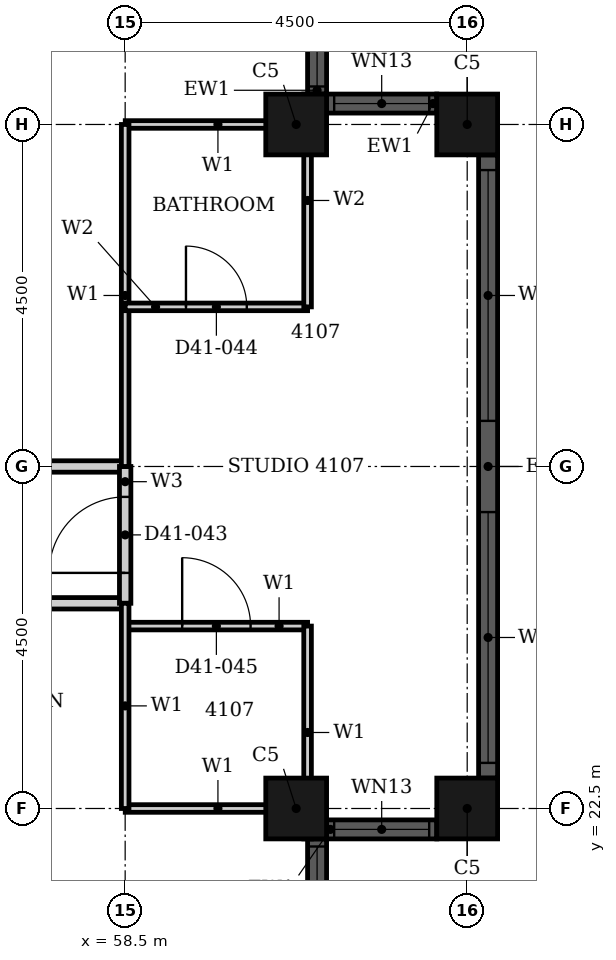
"""IFC4 building model, lengths in metres.
Left out: names, types, materials, properties, quantities, classifications, styles, units other than length and angle.
Written with IfcOpenShell. Run it as: python <this file> out.ifc"""

import sys

from ifc_helpers import new_model, si_unit, direction, frame, frame_2d, origin, origin_2d, place, context, subcontext, project, spatial, rectangle, hollow_rectangle, extrude, element, fill, save


model = new_model("IFC4")
c1 = context("Model", 3, precision=1e-05, world=origin(), true_north=direction((0.0, 1.0)))
c2 = subcontext(c1, "Body", "Model", "MODEL_VIEW")
j1 = project(units=[si_unit("LENGTHUNIT", "METRE"), si_unit("PLANEANGLEUNIT", "RADIAN")], contexts=[c1])
p1 = place(None, origin())
s1 = spatial("IfcSite", under=j1, at=p1, CompositionType="ELEMENT")
p2 = place(p1, origin())
s2 = spatial("IfcBuilding", under=s1, at=p2, CompositionType="ELEMENT")
p3 = place(p2, frame((0.0, 0.0, 165.4)))
s3 = spatial("IfcBuildingStorey", under=s2, at=p3, CompositionType="ELEMENT", Elevation=165.4)
for number, where, z_axis, x_axis in (
    (1, (60.75, 22.5, 0.0), (0.0, 0.0, 1.0), (1.0, 0.0, 0.0)),
    (2, (63.0, 22.5, 0.0), (0.0, 0.0, 1.0), (1.0, 0.0, 0.0)),
    (3, (63.0, 31.5, 0.0), (0.0, 0.0, 1.0), (1.0, 0.0, 0.0)),
    (4, (60.75, 31.5, 0.0), (0.0, 0.0, 1.0), (1.0, 0.0, 0.0)),
):
    element("IfcColumn", number, at=place(p3, frame(where, z_axis=z_axis, x_axis=x_axis)), inside=s3, PredefinedType="COLUMN", context=c2, shape_type="SweptSolid", body=[
        extrude(hollow_rectangle(XDim=0.8, YDim=0.8, WallThickness=0.025, at=origin_2d()), origin(), (0.0, 0.0, 1.0), 3.7),
    ])
p4 = place(p3, frame((61.025, 20.65, 0.0), z_axis=(0.0, 0.0, 1.0), x_axis=(0.0, 1.0, 0.0)))
e5 = element("IfcWall", 5, at=p4, inside=s3, PredefinedType="SOLIDWALL", context=c2, shape_type="SweptSolid", body=[
    extrude(rectangle(XDim=1.45, YDim=0.25, at=frame_2d((0.725, 0.0))), origin(), (0.0, 0.0, 1.0), 3.7),
])
p5 = place(p4, frame((0.1, 0.0, 0.9)))
e6 = element("IfcOpeningElement", 6, at=p5, cuts=e5, PredefinedType="OPENING", context=c2, shape_type="SweptSolid", body=[
    extrude(rectangle(XDim=1.25, YDim=1.85, at=frame_2d((0.625, 0.925))), frame((0.0, 0.135, 0.0), z_axis=(0.0, -1.0, 0.0), x_axis=(1.0, 0.0, 0.0)), (0.0, 0.0, 1.0), 0.27),
])
p6 = place(p3, frame((61.15, 22.225, 0.0), z_axis=(0.0, 0.0, 1.0), x_axis=(1.0, 0.0, 0.0)))
e7 = element("IfcWall", 7, at=p6, inside=s3, PredefinedType="SOLIDWALL", context=c2, shape_type="SweptSolid", body=[
    extrude(rectangle(XDim=1.45, YDim=0.25, at=frame_2d((0.725, 0.0))), origin(), (0.0, 0.0, 1.0), 3.7),
])
p7 = place(p6, frame((0.1, 0.0, 0.9)))
e8 = element("IfcOpeningElement", 8, at=p7, cuts=e7, PredefinedType="OPENING", context=c2, shape_type="SweptSolid", body=[
    extrude(rectangle(XDim=1.25, YDim=1.85, at=frame_2d((0.625, 0.925))), frame((0.0, 0.135, 0.0), z_axis=(0.0, -1.0, 0.0), x_axis=(1.0, 0.0, 0.0)), (0.0, 0.0, 1.0), 0.27),
])
p8 = place(p3, frame((63.275, 22.9, 0.0), z_axis=(0.0, 0.0, 1.0), x_axis=(0.0, 1.0, 0.0)))
e9 = element("IfcWall", 9, at=p8, inside=s3, PredefinedType="SOLIDWALL", context=c2, shape_type="SweptSolid", body=[
    extrude(rectangle(XDim=8.2, YDim=0.25, at=frame_2d((4.1, 0.0))), origin(), (0.0, 0.0, 1.0), 3.7),
])
p9 = place(p8, frame((0.2, 0.0, 0.45)))
e10 = element("IfcOpeningElement", 10, at=p9, cuts=e9, PredefinedType="OPENING", context=c2, shape_type="SweptSolid", body=[
    extrude(rectangle(XDim=3.3, YDim=2.3, at=frame_2d((1.65, 1.15))), frame((0.0, 0.135, 0.0), z_axis=(0.0, -1.0, 0.0), x_axis=(1.0, 0.0, 0.0)), (0.0, 0.0, 1.0), 0.27),
])
p10 = place(p8, frame((4.7, 0.0, 0.45)))
e11 = element("IfcOpeningElement", 11, at=p10, cuts=e9, PredefinedType="OPENING", context=c2, shape_type="SweptSolid", body=[
    extrude(rectangle(XDim=3.3, YDim=2.3, at=frame_2d((1.65, 1.15))), frame((0.0, 0.135, 0.0), z_axis=(0.0, -1.0, 0.0), x_axis=(1.0, 0.0, 0.0)), (0.0, 0.0, 1.0), 0.27),
])
p11 = place(p3, frame((62.6, 31.775, 0.0), z_axis=(0.0, 0.0, 1.0), x_axis=(-1.0, 0.0, 0.0)))
e12 = element("IfcWall", 12, at=p11, inside=s3, PredefinedType="SOLIDWALL", context=c2, shape_type="SweptSolid", body=[
    extrude(rectangle(XDim=1.45, YDim=0.25, at=frame_2d((0.725, 0.0))), origin(), (0.0, 0.0, 1.0), 3.7),
])
p12 = place(p11, frame((0.1, 0.0, 0.9)))
e13 = element("IfcOpeningElement", 13, at=p12, cuts=e12, PredefinedType="OPENING", context=c2, shape_type="SweptSolid", body=[
    extrude(rectangle(XDim=1.25, YDim=1.85, at=frame_2d((0.625, 0.925))), frame((0.0, 0.135, 0.0), z_axis=(0.0, -1.0, 0.0), x_axis=(1.0, 0.0, 0.0)), (0.0, 0.0, 1.0), 0.27),
])
p13 = place(p3, frame((61.025, 31.9, 0.0), z_axis=(0.0, 0.0, 1.0), x_axis=(0.0, 1.0, 0.0)))
e14 = element("IfcWall", 14, at=p13, inside=s3, PredefinedType="SOLIDWALL", context=c2, shape_type="SweptSolid", body=[
    extrude(rectangle(XDim=1.45, YDim=0.25, at=frame_2d((0.725, 0.0))), origin(), (0.0, 0.0, 1.0), 3.7),
])
p14 = place(p13, frame((0.1, 0.0, 0.9)))
e15 = element("IfcOpeningElement", 15, at=p14, cuts=e14, PredefinedType="OPENING", context=c2, shape_type="SweptSolid", body=[
    extrude(rectangle(XDim=1.25, YDim=1.85, at=frame_2d((0.625, 0.925))), frame((0.0, 0.135, 0.0), z_axis=(0.0, -1.0, 0.0), x_axis=(1.0, 0.0, 0.0)), (0.0, 0.0, 1.0), 0.27),
])
p15 = place(p3, frame((46.801, 25.2, 0.0), z_axis=(0.0, 0.0, 1.0), x_axis=(1.0, 0.0, 0.0)))
e16 = element("IfcWall", 16, at=p15, inside=s3, PredefinedType="PARTITIONING", context=c2, shape_type="SweptSolid", body=[
    extrude(rectangle(XDim=11.699, YDim=0.15, at=frame_2d((5.85, 0.0))), origin(), (0.0, 0.0, 1.0), 3.4),
])
p16 = place(p15, frame((6.698, 0.0, 0.0)))
e17 = element("IfcOpeningElement", 17, at=p16, cuts=e16, PredefinedType="OPENING", context=c2, shape_type="SweptSolid", body=[
    extrude(rectangle(XDim=1.0, YDim=2.1, at=frame_2d((0.5, 1.05))), frame((0.0, 0.085, 0.0), z_axis=(0.0, -1.0, 0.0), x_axis=(1.0, 0.0, 0.0)), (0.0, 0.0, 1.0), 0.17),
])
p17 = place(p3, frame((45.0, 27.0, 0.0), z_axis=(0.0, 0.0, 1.0), x_axis=(1.0, 0.0, 0.0)))
e18 = element("IfcWall", 18, at=p17, inside=s3, PredefinedType="PARTITIONING", context=c2, shape_type="SweptSolid", body=[
    extrude(rectangle(XDim=13.5, YDim=0.15, at=frame_2d((6.75, 0.0))), origin(), (0.0, 0.0, 1.0), 2.68),
])
p18 = place(p17, frame((7.15, 0.0, 0.0)))
e19 = element("IfcOpeningElement", 19, at=p18, cuts=e18, PredefinedType="OPENING", context=c2, shape_type="SweptSolid", body=[
    extrude(rectangle(XDim=1.0, YDim=2.1, at=frame_2d((0.5, 1.05))), frame((0.0, 0.085, 0.0), z_axis=(0.0, -1.0, 0.0), x_axis=(1.0, 0.0, 0.0)), (0.0, 0.0, 1.0), 0.17),
])
p19 = place(p3, frame((58.5, 25.2, 0.0), z_axis=(0.0, 0.0, 1.0), x_axis=(0.0, 1.0, 0.0)))
e20 = element("IfcWall", 20, at=p19, inside=s3, PredefinedType="PARTITIONING", context=c2, shape_type="SweptSolid", body=[
    extrude(rectangle(XDim=1.8, YDim=0.15, at=frame_2d((0.9, 0.0))), origin(), (0.0, 0.0, 1.0), 3.4),
])
p20 = place(p19, frame((0.4, 0.0, 0.0)))
e21 = element("IfcOpeningElement", 21, at=p20, cuts=e20, PredefinedType="OPENING", context=c2, shape_type="SweptSolid", body=[
    extrude(rectangle(XDim=1.0, YDim=2.2, at=frame_2d((0.5, 1.1))), frame((0.0, 0.085, 0.0), z_axis=(0.0, -1.0, 0.0), x_axis=(1.0, 0.0, 0.0)), (0.0, 0.0, 1.0), 0.17),
])
p21 = place(p3, frame((58.501, 22.5, 0.0), z_axis=(0.0, 0.0, 1.0), x_axis=(1.0, 0.0, 0.0)))
e22 = element("IfcWall", 22, at=p21, inside=s3, PredefinedType="PARTITIONING", context=c2, shape_type="SweptSolid", body=[
    extrude(rectangle(XDim=2.439, YDim=0.1, at=frame_2d((1.219, 0.0))), origin(), (0.0, 0.0, 1.0), 2.68),
])
p22 = place(p3, frame((58.5, 24.9, 0.0), z_axis=(0.0, 0.0, 1.0), x_axis=(1.0, 0.0, 0.0)))
e23 = element("IfcWall", 23, at=p22, inside=s3, PredefinedType="PARTITIONING", context=c2, shape_type="SweptSolid", body=[
    extrude(rectangle(XDim=2.4, YDim=0.1, at=frame_2d((1.2, 0.0))), origin(), (0.0, 0.0, 1.0), 3.4),
])
p23 = place(p22, frame((0.75, 0.0, 0.0)))
e24 = element("IfcOpeningElement", 24, at=p23, cuts=e23, PredefinedType="OPENING", context=c2, shape_type="SweptSolid", body=[
    extrude(rectangle(XDim=0.9, YDim=2.1, at=frame_2d((0.45, 1.05))), frame((0.0, 0.06, 0.0), z_axis=(0.0, -1.0, 0.0), x_axis=(1.0, 0.0, 0.0)), (0.0, 0.0, 1.0), 0.12),
])
p24 = place(p3, frame((58.501, 31.5, 0.0), z_axis=(0.0, 0.0, 1.0), x_axis=(1.0, 0.0, 0.0)))
e25 = element("IfcWall", 25, at=p24, inside=s3, PredefinedType="PARTITIONING", context=c2, shape_type="SweptSolid", body=[
    extrude(rectangle(XDim=2.439, YDim=0.1, at=frame_2d((1.219, 0.0))), origin(), (0.0, 0.0, 1.0), 2.68),
])
p25 = place(p3, frame((58.5, 27.0, 0.0), z_axis=(0.0, 0.0, 1.0), x_axis=(0.0, 1.0, 0.0)))
e26 = element("IfcWall", 26, at=p25, inside=s3, PredefinedType="PARTITIONING", context=c2, shape_type="SweptSolid", body=[
    extrude(rectangle(XDim=4.5, YDim=0.1, at=frame_2d((2.25, 0.0))), origin(), (0.0, 0.0, 1.0), 3.4),
])
p26 = place(p3, frame((58.5, 22.5, 0.0), z_axis=(0.0, 0.0, 1.0), x_axis=(0.0, 1.0, 0.0)))
e27 = element("IfcWall", 27, at=p26, inside=s3, PredefinedType="PARTITIONING", context=c2, shape_type="SweptSolid", body=[
    extrude(rectangle(XDim=2.7, YDim=0.1, at=frame_2d((1.35, 0.0))), origin(), (0.0, 0.0, 1.0), 3.4),
])
p27 = place(p3, frame((60.9, 22.1, 0.0), z_axis=(0.0, 0.0, 1.0), x_axis=(0.0, 1.0, 0.0)))
e28 = element("IfcWall", 28, at=p27, inside=s3, PredefinedType="PARTITIONING", context=c2, shape_type="SweptSolid", body=[
    extrude(rectangle(XDim=2.8, YDim=0.1, at=frame_2d((1.4, 0.0))), origin(), (0.0, 0.0, 1.0), 3.4),
])
p28 = place(p3, frame((58.5, 29.1, 0.0), z_axis=(0.0, 0.0, 1.0), x_axis=(1.0, 0.0, 0.0)))
e29 = element("IfcWall", 29, at=p28, inside=s3, PredefinedType="PARTITIONING", context=c2, shape_type="SweptSolid", body=[
    extrude(rectangle(XDim=2.4, YDim=0.1, at=frame_2d((1.2, 0.0))), origin(), (0.0, 0.0, 1.0), 3.4),
])
p29 = place(p28, frame((0.8, 0.0, 0.0)))
e30 = element("IfcOpeningElement", 30, at=p29, cuts=e29, PredefinedType="OPENING", context=c2, shape_type="SweptSolid", body=[
    extrude(rectangle(XDim=0.8, YDim=2.1, at=frame_2d((0.4, 1.05))), frame((0.0, 0.06, 0.0), z_axis=(0.0, -1.0, 0.0), x_axis=(1.0, 0.0, 0.0)), (0.0, 0.0, 1.0), 0.12),
])
p30 = place(p3, frame((60.9, 29.1, 0.0), z_axis=(0.0, 0.0, 1.0), x_axis=(0.0, 1.0, 0.0)))
e31 = element("IfcWall", 31, at=p30, inside=s3, PredefinedType="PARTITIONING", context=c2, shape_type="SweptSolid", body=[
    extrude(rectangle(XDim=2.8, YDim=0.1, at=frame_2d((1.4, 0.0))), origin(), (0.0, 0.0, 1.0), 3.4),
])
p31 = place(p5, origin())
e32 = element("IfcWindow", 32, at=p31, inside=s3, PartitioningType="SINGLE_PANEL", PredefinedType="WINDOW", context=c2, shape_type="SweptSolid", body=[
    extrude(rectangle(XDim=1.25, YDim=1.85, at=frame_2d((0.625, 0.925))), frame((0.0, 0.03, 0.0), z_axis=(0.0, -1.0, 0.0), x_axis=(1.0, 0.0, 0.0)), (0.0, 0.0, 1.0), 0.06),
])
fill(e6, e32)
p32 = place(p7, origin())
e33 = element("IfcWindow", 33, at=p32, inside=s3, PartitioningType="SINGLE_PANEL", PredefinedType="WINDOW", context=c2, shape_type="SweptSolid", body=[
    extrude(rectangle(XDim=1.25, YDim=1.85, at=frame_2d((0.625, 0.925))), frame((0.0, 0.03, 0.0), z_axis=(0.0, -1.0, 0.0), x_axis=(1.0, 0.0, 0.0)), (0.0, 0.0, 1.0), 0.06),
])
fill(e8, e33)
p33 = place(p9, origin())
e34 = element("IfcWindow", 34, at=p33, inside=s3, PartitioningType="SINGLE_PANEL", PredefinedType="WINDOW", context=c2, shape_type="SweptSolid", body=[
    extrude(rectangle(XDim=3.3, YDim=2.3, at=frame_2d((1.65, 1.15))), frame((0.0, 0.03, 0.0), z_axis=(0.0, -1.0, 0.0), x_axis=(1.0, 0.0, 0.0)), (0.0, 0.0, 1.0), 0.06),
])
fill(e10, e34)
p34 = place(p10, origin())
e35 = element("IfcWindow", 35, at=p34, inside=s3, PartitioningType="SINGLE_PANEL", PredefinedType="WINDOW", context=c2, shape_type="SweptSolid", body=[
    extrude(rectangle(XDim=3.3, YDim=2.3, at=frame_2d((1.65, 1.15))), frame((0.0, 0.03, 0.0), z_axis=(0.0, -1.0, 0.0), x_axis=(1.0, 0.0, 0.0)), (0.0, 0.0, 1.0), 0.06),
])
fill(e11, e35)
p35 = place(p12, origin())
e36 = element("IfcWindow", 36, at=p35, inside=s3, PartitioningType="SINGLE_PANEL", PredefinedType="WINDOW", context=c2, shape_type="SweptSolid", body=[
    extrude(rectangle(XDim=1.25, YDim=1.85, at=frame_2d((0.625, 0.925))), frame((0.0, 0.03, 0.0), z_axis=(0.0, -1.0, 0.0), x_axis=(1.0, 0.0, 0.0)), (0.0, 0.0, 1.0), 0.06),
])
fill(e13, e36)
p36 = place(p14, origin())
e37 = element("IfcWindow", 37, at=p36, inside=s3, PartitioningType="SINGLE_PANEL", PredefinedType="WINDOW", context=c2, shape_type="SweptSolid", body=[
    extrude(rectangle(XDim=1.25, YDim=1.85, at=frame_2d((0.625, 0.925))), frame((0.0, 0.03, 0.0), z_axis=(0.0, -1.0, 0.0), x_axis=(1.0, 0.0, 0.0)), (0.0, 0.0, 1.0), 0.06),
])
fill(e15, e37)
p37 = place(p20, origin())
e38 = element("IfcDoor", 38, at=p37, inside=s3, OperationType="SINGLE_SWING_LEFT", PredefinedType="DOOR", context=c2, shape_type="SweptSolid", body=[
    extrude(rectangle(XDim=1.0, YDim=2.2, at=frame_2d((0.5, 1.1))), frame((0.0, 0.025, 0.0), z_axis=(0.0, -1.0, 0.0), x_axis=(1.0, 0.0, 0.0)), (0.0, 0.0, 1.0), 0.05),
])
fill(e21, e38)
p38 = place(p29, origin())
e39 = element("IfcDoor", 39, at=p38, inside=s3, OperationType="SINGLE_SWING_LEFT", PredefinedType="DOOR", context=c2, shape_type="SweptSolid", body=[
    extrude(rectangle(XDim=0.8, YDim=2.1, at=frame_2d((0.4, 1.05))), frame((0.0, 0.025, 0.0), z_axis=(0.0, -1.0, 0.0), x_axis=(1.0, 0.0, 0.0)), (0.0, 0.0, 1.0), 0.05),
])
fill(e30, e39)
p39 = place(p23, origin())
e40 = element("IfcDoor", 40, at=p39, inside=s3, OperationType="SINGLE_SWING_RIGHT", PredefinedType="DOOR", context=c2, shape_type="SweptSolid", body=[
    extrude(rectangle(XDim=0.9, YDim=2.1, at=frame_2d((0.45, 1.05))), frame((0.0, 0.025, 0.0), z_axis=(0.0, -1.0, 0.0), x_axis=(1.0, 0.0, 0.0)), (0.0, 0.0, 1.0), 0.05),
])
fill(e24, e40)
save(model, sys.argv[1])
